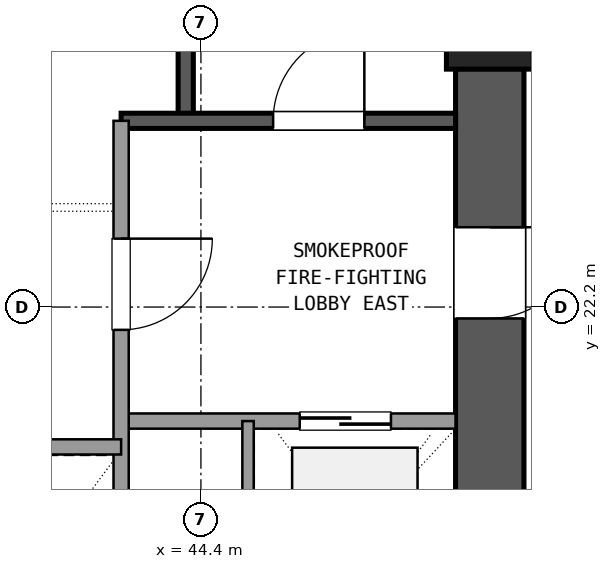
"""IFC4 building model, lengths in metres.
Left out: names, types, materials, properties, quantities, classifications, styles, units other than length and angle.
Written with IfcOpenShell. Run it as: python <this file> out.ifc"""

import sys

from ifc_helpers import new_model, si_unit, direction, frame, frame_2d, origin, origin_2d, place, context, subcontext, project, spatial, rectangle, extrude, element, fill, save


model = new_model("IFC4")
c1 = context("Model", 3, precision=1e-05, world=origin(), true_north=direction((0.0, 1.0)))
c2 = subcontext(c1, "Body", "Model", "MODEL_VIEW")
j1 = project(units=[si_unit("LENGTHUNIT", "METRE"), si_unit("PLANEANGLEUNIT", "RADIAN")], contexts=[c1])
p1 = place(None, origin())
s1 = spatial("IfcSite", under=j1, at=p1, CompositionType="ELEMENT")
p2 = place(p1, origin())
s2 = spatial("IfcBuilding", under=s1, at=p2, CompositionType="ELEMENT")
p3 = place(p2, frame((0.0, 0.0, 31.14)))
s3 = spatial("IfcBuildingStorey", under=s2, at=p3, CompositionType="ELEMENT", Elevation=31.14)
p4 = place(p3, frame((48.2, 25.9, 0.0), z_axis=(0.0, 0.0, 1.0), x_axis=(1.0, 0.0, 0.0)))
e1 = element("IfcColumn", 1, at=p4, inside=s3, PredefinedType="COLUMN", context=c2, shape_type="SweptSolid", body=[
    extrude(rectangle(XDim=1.14, YDim=1.14, at=origin_2d()), origin(), (0.0, 0.0, 1.0), 3.6),
])
p5 = place(p3, frame((48.2, 17.865, 0.0), z_axis=(0.0, 0.0, 1.0), x_axis=(0.0, 1.0, 0.0)))
e2 = element("IfcWall", 2, at=p5, inside=s3, PredefinedType="SHEAR", context=c2, shape_type="SweptSolid", body=[
    extrude(rectangle(XDim=7.47, YDim=0.9, at=frame_2d((3.735, 0.0))), origin(), (0.0, 0.0, 1.0), 3.32),
])
p6 = place(p5, frame((4.185, 0.0, 0.0)))
e3 = element("IfcOpeningElement", 3, at=p6, cuts=e2, PredefinedType="OPENING", context=c2, shape_type="SweptSolid", body=[
    extrude(rectangle(XDim=1.2, YDim=2.15, at=frame_2d((0.6, 1.075))), frame((0.0, 0.46, 0.0), z_axis=(0.0, -1.0, 0.0), x_axis=(1.0, 0.0, 0.0)), (0.0, 0.0, 1.0), 0.92),
])
p7 = place(p3, frame((44.2, 24.65, 0.0), z_axis=(0.0, 0.0, 1.0), x_axis=(0.0, 1.0, 0.0)))
e4 = element("IfcWall", 4, at=p7, inside=s3, PredefinedType="SHEAR", context=c2, shape_type="SweptSolid", body=[
    extrude(rectangle(XDim=9.4, YDim=0.2, at=frame_2d((4.7, 0.0))), origin(), (0.0, 0.0, 1.0), 3.32),
])
p8 = place(p3, frame((43.35, 24.65, 0.0), z_axis=(0.0, 0.0, 1.0), x_axis=(1.0, 0.0, 0.0)))
e5 = element("IfcWall", 5, at=p8, inside=s3, PredefinedType="SHEAR", context=c2, shape_type="SweptSolid", body=[
    extrude(rectangle(XDim=4.4, YDim=0.2, at=frame_2d((2.2, 0.0))), origin(), (0.0, 0.0, 1.0), 3.32),
])
p9 = place(p8, frame((2.0, 0.0, 0.0)))
e6 = element("IfcOpeningElement", 6, at=p9, cuts=e5, PredefinedType="OPENING", context=c2, shape_type="SweptSolid", body=[
    extrude(rectangle(XDim=1.2, YDim=2.15, at=frame_2d((0.6, 1.075))), frame((0.0, 0.11, 0.0), z_axis=(0.0, -1.0, 0.0), x_axis=(1.0, 0.0, 0.0)), (0.0, 0.0, 1.0), 0.22),
])
p10 = place(p3, frame((43.35, 20.7, 0.0), z_axis=(0.0, 0.0, 1.0), x_axis=(1.0, 0.0, 0.0)))
e7 = element("IfcWall", 7, at=p10, inside=s3, PredefinedType="SOLIDWALL", context=c2, shape_type="SweptSolid", body=[
    extrude(rectangle(XDim=4.4, YDim=0.2, at=frame_2d((2.2, 0.0))), origin(), (0.0, 0.0, 1.0), 2.61),
])
p11 = place(p10, frame((2.35, 0.0, 0.0)))
e8 = element("IfcOpeningElement", 8, at=p11, cuts=e7, PredefinedType="OPENING", context=c2, shape_type="SweptSolid", body=[
    extrude(rectangle(XDim=1.2, YDim=2.15, at=frame_2d((0.6, 1.075))), frame((0.0, 0.11, 0.0), z_axis=(0.0, -1.0, 0.0), x_axis=(1.0, 0.0, 0.0)), (0.0, 0.0, 1.0), 0.22),
])
p12 = place(p3, frame((43.35, 17.75, 0.0), z_axis=(0.0, 0.0, 1.0), x_axis=(0.0, 1.0, 0.0)))
e9 = element("IfcWall", 9, at=p12, inside=s3, PredefinedType="SOLIDWALL", context=c2, shape_type="SweptSolid", body=[
    extrude(rectangle(XDim=6.9, YDim=0.2, at=frame_2d((3.45, 0.0))), origin(), (0.0, 0.0, 1.0), 2.61),
])
p13 = place(p12, frame((4.15, 0.0, 0.0)))
e10 = element("IfcOpeningElement", 10, at=p13, cuts=e9, PredefinedType="OPENING", context=c2, shape_type="SweptSolid", body=[
    extrude(rectangle(XDim=1.2, YDim=2.15, at=frame_2d((0.6, 1.075))), frame((0.0, 0.11, 0.0), z_axis=(0.0, -1.0, 0.0), x_axis=(1.0, 0.0, 0.0)), (0.0, 0.0, 1.0), 0.22),
])
p14 = place(p3, frame((45.02, 17.75, 0.0), z_axis=(0.0, 0.0, 1.0), x_axis=(0.0, 1.0, 0.0)))
e11 = element("IfcWall", 11, at=p14, inside=s3, PredefinedType="PARTITIONING", context=c2, shape_type="SweptSolid", body=[
    extrude(rectangle(XDim=2.95, YDim=0.15, at=frame_2d((1.475, 0.0))), origin(), (0.0, 0.0, 1.0), 2.61),
])
p15 = place(p3, frame((37.25, 20.36, 0.0), z_axis=(0.0, 0.0, 1.0), x_axis=(1.0, 0.0, 0.0)))
e12 = element("IfcWall", 12, at=p15, inside=s3, PredefinedType="SOLIDWALL", context=c2, shape_type="SweptSolid", body=[
    extrude(rectangle(XDim=6.1, YDim=0.2, at=frame_2d((3.05, 0.0))), origin(), (0.0, 0.0, 1.0), 2.61),
])
p16 = place(p9, origin())
e13 = element("IfcDoor", 13, at=p16, inside=s3, OperationType="SINGLE_SWING_RIGHT", PredefinedType="DOOR", context=c2, shape_type="SweptSolid", body=[
    extrude(rectangle(XDim=1.2, YDim=2.15, at=frame_2d((0.6, 1.075))), frame((0.0, 0.025, 0.0), z_axis=(0.0, -1.0, 0.0), x_axis=(1.0, 0.0, 0.0)), (0.0, 0.0, 1.0), 0.05),
])
fill(e6, e13)
p17 = place(p11, origin())
e14 = element("IfcDoor", 14, at=p17, inside=s3, OperationType="SLIDING_TO_RIGHT", PredefinedType="DOOR", context=c2, shape_type="SweptSolid", body=[
    extrude(rectangle(XDim=1.2, YDim=2.15, at=frame_2d((0.6, 1.075))), frame((0.0, 0.025, 0.0), z_axis=(0.0, -1.0, 0.0), x_axis=(1.0, 0.0, 0.0)), (0.0, 0.0, 1.0), 0.05),
])
fill(e8, e14)
p18 = place(p13, frame((1.2, 0.0, 0.0), z_axis=(0.0, 0.0, 1.0), x_axis=(-1.0, 0.0, 0.0)))
e15 = element("IfcDoor", 15, at=p18, inside=s3, OperationType="SINGLE_SWING_RIGHT", PredefinedType="DOOR", context=c2, shape_type="SweptSolid", body=[
    extrude(rectangle(XDim=1.2, YDim=2.15, at=frame_2d((0.6, 1.075))), frame((0.0, 0.025, 0.0), z_axis=(0.0, -1.0, 0.0), x_axis=(1.0, 0.0, 0.0)), (0.0, 0.0, 1.0), 0.05),
])
fill(e10, e15)
p19 = place(p6, frame((1.2, 0.0, 0.0), z_axis=(0.0, 0.0, 1.0), x_axis=(-1.0, 0.0, 0.0)))
e16 = element("IfcDoor", 16, at=p19, inside=s3, OperationType="SINGLE_SWING_RIGHT", PredefinedType="DOOR", context=c2, shape_type="SweptSolid", body=[
    extrude(rectangle(XDim=1.2, YDim=2.15, at=frame_2d((0.6, 1.075))), frame((0.0, 0.025, 0.0), z_axis=(0.0, -1.0, 0.0), x_axis=(1.0, 0.0, 0.0)), (0.0, 0.0, 1.0), 0.05),
])
fill(e3, e16)
save(model, sys.argv[1])
